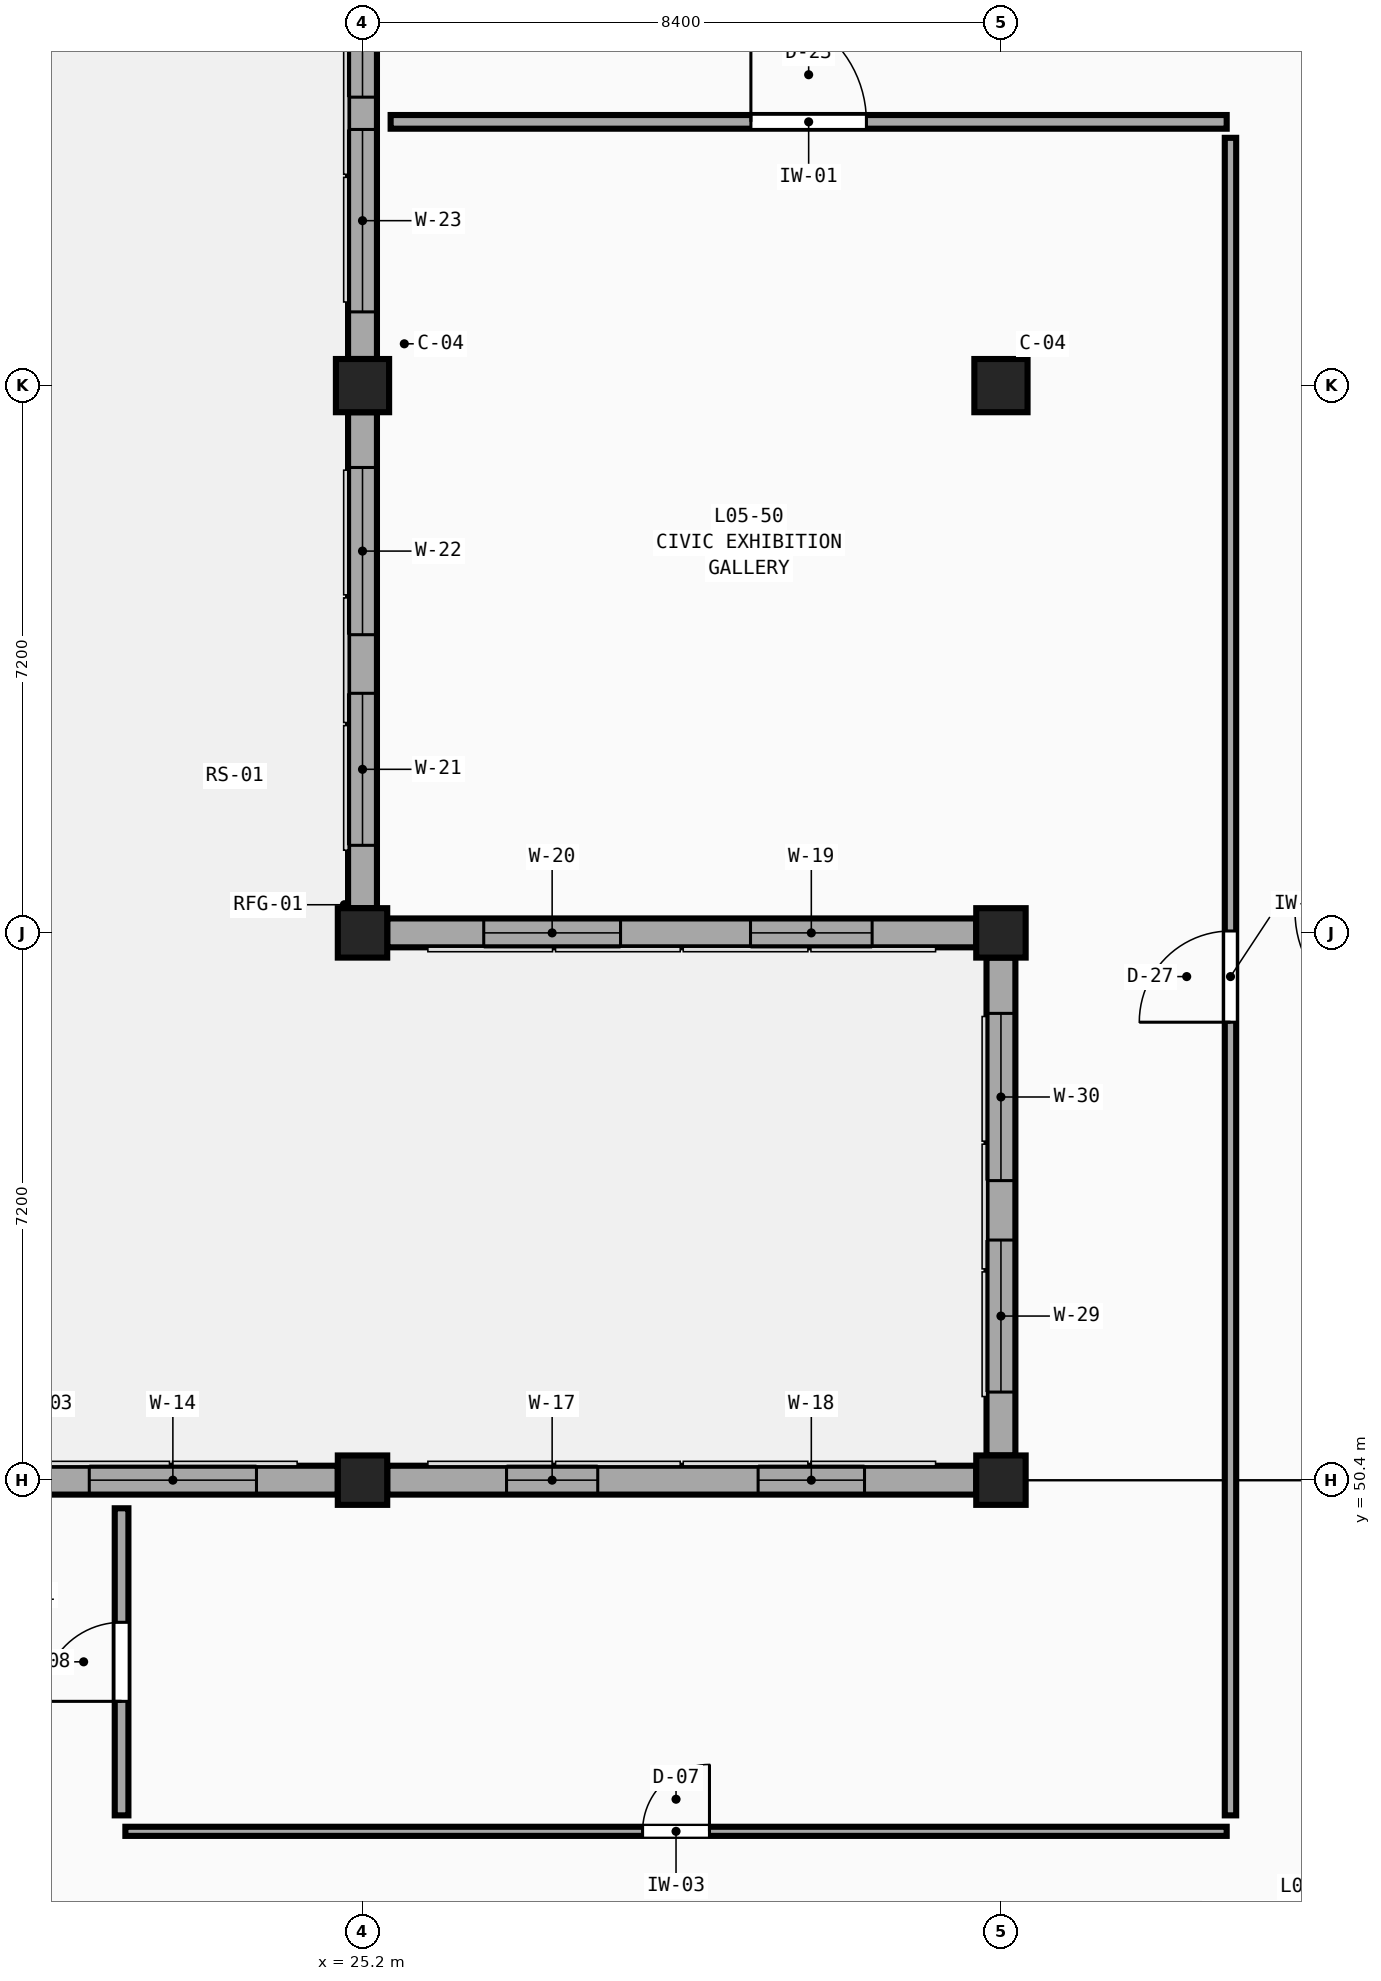
"""IFC4 building model, lengths in metres.
Left out: names, types, materials, properties, quantities, classifications, styles, units other than length and angle.
Written with IfcOpenShell. Run it as: python <this file> out.ifc"""

import sys

from ifc_helpers import new_model, si_unit, direction, frame, frame_2d, origin, origin_2d, place, context, subcontext, project, spatial, rectangle, extrude, element, fill, save


model = new_model("IFC4")
c1 = context("Model", 3, precision=1e-05, world=origin(), true_north=direction((0.0, 1.0)))
c2 = subcontext(c1, "Body", "Model", "MODEL_VIEW")
j1 = project(units=[si_unit("LENGTHUNIT", "METRE"), si_unit("PLANEANGLEUNIT", "RADIAN")], contexts=[c1])
p1 = place(None, origin())
s1 = spatial("IfcSite", under=j1, at=p1, CompositionType="ELEMENT")
p2 = place(p1, origin())
s2 = spatial("IfcBuilding", under=s1, at=p2, CompositionType="ELEMENT")
p3 = place(p2, frame((0.0, 0.0, 23.4)))
s3 = spatial("IfcBuildingStorey", under=s2, at=p3, CompositionType="ELEMENT", Elevation=23.4)
for number, where, z_axis, x_axis in (
    (1, (25.2, 50.4, 0.0), (0.0, 0.0, 1.0), (1.0, 0.0, 0.0)),
    (2, (25.2, 57.6, 0.0), (0.0, 0.0, 1.0), (1.0, 0.0, 0.0)),
):
    element("IfcColumn", number, at=place(p3, frame(where, z_axis=z_axis, x_axis=x_axis)), inside=s3, PredefinedType="COLUMN", context=c2, shape_type="SweptSolid", body=[
        extrude(rectangle(XDim=0.65, YDim=0.65, at=origin_2d()), origin(), (0.0, 0.0, 1.0), 4.5),
    ])
p4 = place(p3, frame((25.2, 64.8, 0.0), z_axis=(0.0, 0.0, 1.0), x_axis=(1.0, 0.0, 0.0)))
e3 = element("IfcColumn", 3, at=p4, inside=s3, PredefinedType="COLUMN", context=c2, shape_type="SweptSolid", body=[
    extrude(rectangle(XDim=0.7, YDim=0.7, at=origin_2d()), origin(), (0.0, 0.0, 1.0), 4.5),
])
for number, where, z_axis, x_axis in (
    (4, (33.6, 50.4, 0.0), (0.0, 0.0, 1.0), (1.0, 0.0, 0.0)),
    (5, (33.6, 57.6, 0.0), (0.0, 0.0, 1.0), (1.0, 0.0, 0.0)),
):
    element("IfcColumn", number, at=place(p3, frame(where, z_axis=z_axis, x_axis=x_axis)), inside=s3, PredefinedType="COLUMN", context=c2, shape_type="SweptSolid", body=[
        extrude(rectangle(XDim=0.65, YDim=0.65, at=origin_2d()), origin(), (0.0, 0.0, 1.0), 4.5),
    ])
p5 = place(p3, frame((33.6, 64.8, 0.0), z_axis=(0.0, 0.0, 1.0), x_axis=(1.0, 0.0, 0.0)))
e6 = element("IfcColumn", 6, at=p5, inside=s3, PredefinedType="COLUMN", context=c2, shape_type="SweptSolid", body=[
    extrude(rectangle(XDim=0.7, YDim=0.7, at=origin_2d()), origin(), (0.0, 0.0, 1.0), 4.5),
])
p6 = place(p3, frame((17.125, 50.4, 0.0), z_axis=(0.0, 0.0, 1.0), x_axis=(1.0, 0.0, 0.0)))
e7 = element("IfcWall", 7, at=p6, inside=s3, PredefinedType="SOLIDWALL", context=c2, shape_type="SweptSolid", body=[
    extrude(rectangle(XDim=7.75, YDim=0.38, at=frame_2d((3.875, 0.0))), origin(), (0.0, 0.0, 1.0), 3.66),
])
p7 = place(p6, frame((1.17, 0.0, 0.75)))
e8 = element("IfcOpeningElement", 8, at=p7, cuts=e7, PredefinedType="OPENING", context=c2, shape_type="SweptSolid", body=[
    extrude(rectangle(XDim=2.0, YDim=2.08, at=frame_2d((1.0, 1.04))), frame((0.0, 0.21, 0.0), z_axis=(0.0, -1.0, 0.0), x_axis=(1.0, 0.0, 0.0)), (0.0, 0.0, 1.0), 0.42),
])
p8 = place(p6, frame((4.48, 0.0, 0.75)))
e9 = element("IfcOpeningElement", 9, at=p8, cuts=e7, PredefinedType="OPENING", context=c2, shape_type="SweptSolid", body=[
    extrude(rectangle(XDim=2.2, YDim=2.08, at=frame_2d((1.1, 1.04))), frame((0.0, 0.21, 0.0), z_axis=(0.0, -1.0, 0.0), x_axis=(1.0, 0.0, 0.0)), (0.0, 0.0, 1.0), 0.42),
])
p9 = place(p3, frame((25.525, 50.4, 0.0), z_axis=(0.0, 0.0, 1.0), x_axis=(1.0, 0.0, 0.0)))
e10 = element("IfcWall", 10, at=p9, inside=s3, PredefinedType="SOLIDWALL", context=c2, shape_type="SweptSolid", body=[
    extrude(rectangle(XDim=7.75, YDim=0.38, at=frame_2d((3.875, 0.0))), origin(), (0.0, 0.0, 1.0), 3.66),
])
p10 = place(p9, frame((1.57, 0.0, 0.75)))
e11 = element("IfcOpeningElement", 11, at=p10, cuts=e10, PredefinedType="OPENING", context=c2, shape_type="SweptSolid", body=[
    extrude(rectangle(XDim=1.2, YDim=2.26, at=frame_2d((0.6, 1.13))), frame((0.0, 0.21, 0.0), z_axis=(0.0, -1.0, 0.0), x_axis=(1.0, 0.0, 0.0)), (0.0, 0.0, 1.0), 0.42),
])
p11 = place(p9, frame((4.88, 0.0, 0.75)))
e12 = element("IfcOpeningElement", 12, at=p11, cuts=e10, PredefinedType="OPENING", context=c2, shape_type="SweptSolid", body=[
    extrude(rectangle(XDim=1.4, YDim=2.26, at=frame_2d((0.7, 1.13))), frame((0.0, 0.21, 0.0), z_axis=(0.0, -1.0, 0.0), x_axis=(1.0, 0.0, 0.0)), (0.0, 0.0, 1.0), 0.42),
])
p12 = place(p3, frame((33.275, 57.6, 0.0), z_axis=(0.0, 0.0, 1.0), x_axis=(-1.0, 0.0, 0.0)))
e13 = element("IfcWall", 13, at=p12, inside=s3, PredefinedType="SOLIDWALL", context=c2, shape_type="SweptSolid", body=[
    extrude(rectangle(XDim=7.75, YDim=0.38, at=frame_2d((3.875, 0.0))), origin(), (0.0, 0.0, 1.0), 3.66),
])
p13 = place(p12, frame((1.37, 0.0, 0.75)))
e14 = element("IfcOpeningElement", 14, at=p13, cuts=e13, PredefinedType="OPENING", context=c2, shape_type="SweptSolid", body=[
    extrude(rectangle(XDim=1.6, YDim=2.26, at=frame_2d((0.8, 1.13))), frame((0.0, 0.21, 0.0), z_axis=(0.0, -1.0, 0.0), x_axis=(1.0, 0.0, 0.0)), (0.0, 0.0, 1.0), 0.42),
])
p14 = place(p12, frame((4.68, 0.0, 0.75)))
e15 = element("IfcOpeningElement", 15, at=p14, cuts=e13, PredefinedType="OPENING", context=c2, shape_type="SweptSolid", body=[
    extrude(rectangle(XDim=1.8, YDim=2.26, at=frame_2d((0.9, 1.13))), frame((0.0, 0.21, 0.0), z_axis=(0.0, -1.0, 0.0), x_axis=(1.0, 0.0, 0.0)), (0.0, 0.0, 1.0), 0.42),
])
p15 = place(p3, frame((25.2, 57.925, 0.0), z_axis=(0.0, 0.0, 1.0), x_axis=(0.0, 1.0, 0.0)))
e16 = element("IfcWall", 16, at=p15, inside=s3, PredefinedType="SOLIDWALL", context=c2, shape_type="SweptSolid", body=[
    extrude(rectangle(XDim=6.525, YDim=0.38, at=frame_2d((3.262, 0.0))), origin(), (0.0, 0.0, 1.0), 3.66),
])
p16 = place(p15, frame((0.827, 0.0, 0.75)))
e17 = element("IfcOpeningElement", 17, at=p16, cuts=e16, PredefinedType="OPENING", context=c2, shape_type="SweptSolid", body=[
    extrude(rectangle(XDim=2.0, YDim=2.26, at=frame_2d((1.0, 1.13))), frame((0.0, 0.21, 0.0), z_axis=(0.0, -1.0, 0.0), x_axis=(1.0, 0.0, 0.0)), (0.0, 0.0, 1.0), 0.42),
])
p17 = place(p15, frame((3.598, 0.0, 0.75)))
e18 = element("IfcOpeningElement", 18, at=p17, cuts=e16, PredefinedType="OPENING", context=c2, shape_type="SweptSolid", body=[
    extrude(rectangle(XDim=2.2, YDim=2.26, at=frame_2d((1.1, 1.13))), frame((0.0, 0.21, 0.0), z_axis=(0.0, -1.0, 0.0), x_axis=(1.0, 0.0, 0.0)), (0.0, 0.0, 1.0), 0.42),
])
p18 = place(p3, frame((25.2, 65.15, 0.0), z_axis=(0.0, 0.0, 1.0), x_axis=(0.0, 1.0, 0.0)))
e19 = element("IfcWall", 19, at=p18, inside=s3, PredefinedType="SOLIDWALL", context=c2, shape_type="SweptSolid", body=[
    extrude(rectangle(XDim=6.5, YDim=0.38, at=frame_2d((3.25, 0.0))), origin(), (0.0, 0.0, 1.0), 3.66),
])
p19 = place(p18, frame((0.62, 0.0, 0.75)))
e20 = element("IfcOpeningElement", 20, at=p19, cuts=e19, PredefinedType="OPENING", context=c2, shape_type="SweptSolid", body=[
    extrude(rectangle(XDim=2.4, YDim=2.26, at=frame_2d((1.2, 1.13))), frame((0.0, 0.21, 0.0), z_axis=(0.0, -1.0, 0.0), x_axis=(1.0, 0.0, 0.0)), (0.0, 0.0, 1.0), 0.42),
])
p20 = place(p18, frame((3.445, 0.0, 0.75)))
e21 = element("IfcOpeningElement", 21, at=p20, cuts=e19, PredefinedType="OPENING", context=c2, shape_type="SweptSolid", body=[
    extrude(rectangle(XDim=2.47, YDim=2.26, at=frame_2d((1.235, 1.13))), frame((0.0, 0.21, 0.0), z_axis=(0.0, -1.0, 0.0), x_axis=(1.0, 0.0, 0.0)), (0.0, 0.0, 1.0), 0.42),
])
p21 = place(p3, frame((33.6, 50.725, 0.0), z_axis=(0.0, 0.0, 1.0), x_axis=(0.0, 1.0, 0.0)))
e22 = element("IfcWall", 22, at=p21, inside=s3, PredefinedType="SOLIDWALL", context=c2, shape_type="SweptSolid", body=[
    extrude(rectangle(XDim=6.55, YDim=0.38, at=frame_2d((3.275, 0.0))), origin(), (0.0, 0.0, 1.0), 3.66),
])
p22 = place(p21, frame((0.834, 0.0, 0.75)))
e23 = element("IfcOpeningElement", 23, at=p22, cuts=e22, PredefinedType="OPENING", context=c2, shape_type="SweptSolid", body=[
    extrude(rectangle(XDim=2.0, YDim=2.44, at=frame_2d((1.0, 1.22))), frame((0.0, 0.21, 0.0), z_axis=(0.0, -1.0, 0.0), x_axis=(1.0, 0.0, 0.0)), (0.0, 0.0, 1.0), 0.42),
])
p23 = place(p21, frame((3.616, 0.0, 0.75)))
e24 = element("IfcOpeningElement", 24, at=p23, cuts=e22, PredefinedType="OPENING", context=c2, shape_type="SweptSolid", body=[
    extrude(rectangle(XDim=2.2, YDim=2.44, at=frame_2d((1.1, 1.22))), frame((0.0, 0.21, 0.0), z_axis=(0.0, -1.0, 0.0), x_axis=(1.0, 0.0, 0.0)), (0.0, 0.0, 1.0), 0.42),
])
p24 = place(p3, frame((36.62, 45.99, 0.0), z_axis=(0.0, 0.0, 1.0), x_axis=(0.0, 1.0, 0.0)))
e25 = element("IfcWall", 25, at=p24, inside=s3, PredefinedType="PARTITIONING", context=c2, shape_type="SweptSolid", body=[
    extrude(rectangle(XDim=22.07, YDim=0.15, at=frame_2d((11.035, 0.0))), origin(), (0.0, 0.0, 1.0), 4.21),
])
p25 = place(p24, frame((10.435, 0.0, 0.0)))
e26 = element("IfcOpeningElement", 26, at=p25, cuts=e25, PredefinedType="OPENING", context=c2, shape_type="SweptSolid", body=[
    extrude(rectangle(XDim=1.2, YDim=2.37, at=frame_2d((0.6, 1.185))), frame((0.0, 0.095, 0.0), z_axis=(0.0, -1.0, 0.0), x_axis=(1.0, 0.0, 0.0)), (0.0, 0.0, 1.0), 0.19),
])
p26 = place(p3, frame((22.08, 45.78, 0.0), z_axis=(0.0, 0.0, 1.0), x_axis=(1.0, 0.0, 0.0)))
e27 = element("IfcWall", 27, at=p26, inside=s3, PredefinedType="PARTITIONING", context=c2, shape_type="SweptSolid", body=[
    extrude(rectangle(XDim=14.49, YDim=0.12, at=frame_2d((7.245, 0.0))), origin(), (0.0, 0.0, 1.0), 4.21),
])
p27 = place(p26, frame((6.805, 0.0, 0.0)))
e28 = element("IfcOpeningElement", 28, at=p27, cuts=e27, PredefinedType="OPENING", context=c2, shape_type="SweptSolid", body=[
    extrude(rectangle(XDim=0.88, YDim=2.13, at=frame_2d((0.44, 1.065))), frame((0.0, 0.08, 0.0), z_axis=(0.0, -1.0, 0.0), x_axis=(1.0, 0.0, 0.0)), (0.0, 0.0, 1.0), 0.16),
])
p28 = place(p3, frame((25.57, 68.27, 0.0), z_axis=(0.0, 0.0, 1.0), x_axis=(1.0, 0.0, 0.0)))
e29 = element("IfcWall", 29, at=p28, inside=s3, PredefinedType="PARTITIONING", context=c2, shape_type="SweptSolid", body=[
    extrude(rectangle(XDim=11.0, YDim=0.18, at=frame_2d((5.5, 0.0))), origin(), (0.0, 0.0, 1.0), 4.21),
])
p29 = place(p28, frame((4.74, 0.0, 0.0)))
e30 = element("IfcOpeningElement", 30, at=p29, cuts=e29, PredefinedType="OPENING", context=c2, shape_type="SweptSolid", body=[
    extrude(rectangle(XDim=1.52, YDim=2.29, at=frame_2d((0.76, 1.145))), frame((0.0, 0.11, 0.0), z_axis=(0.0, -1.0, 0.0), x_axis=(1.0, 0.0, 0.0)), (0.0, 0.0, 1.0), 0.22),
])
p30 = place(p3, frame((22.03, 45.99, 0.0), z_axis=(0.0, 0.0, 1.0), x_axis=(0.0, 1.0, 0.0)))
e31 = element("IfcWall", 31, at=p30, inside=s3, PredefinedType="PARTITIONING", context=c2, shape_type="SweptSolid", body=[
    extrude(rectangle(XDim=4.04, YDim=0.18, at=frame_2d((2.02, 0.0))), origin(), (0.0, 0.0, 1.0), 4.21),
])
p31 = place(p30, frame((1.5, 0.0, 0.0)))
e32 = element("IfcOpeningElement", 32, at=p31, cuts=e31, PredefinedType="OPENING", context=c2, shape_type="SweptSolid", body=[
    extrude(rectangle(XDim=1.04, YDim=2.13, at=frame_2d((0.52, 1.065))), frame((0.0, 0.11, 0.0), z_axis=(0.0, -1.0, 0.0), x_axis=(1.0, 0.0, 0.0)), (0.0, 0.0, 1.0), 0.22),
])
p32 = place(p8, origin())
e33 = element("IfcWindow", 33, at=p32, inside=s3, PartitioningType="TRIPLE_PANEL_VERTICAL", PredefinedType="WINDOW", context=c2, shape_type="SweptSolid", body=[
    extrude(rectangle(XDim=2.2, YDim=2.08, at=frame_2d((1.1, 1.04))), frame((0.0, 0.03, 0.0), z_axis=(0.0, -1.0, 0.0), x_axis=(1.0, 0.0, 0.0)), (0.0, 0.0, 1.0), 0.06),
])
fill(e9, e33)
p33 = place(p10, origin())
e34 = element("IfcWindow", 34, at=p33, inside=s3, PartitioningType="SINGLE_PANEL", PredefinedType="WINDOW", context=c2, shape_type="SweptSolid", body=[
    extrude(rectangle(XDim=1.2, YDim=2.26, at=frame_2d((0.6, 1.13))), frame((0.0, 0.03, 0.0), z_axis=(0.0, -1.0, 0.0), x_axis=(1.0, 0.0, 0.0)), (0.0, 0.0, 1.0), 0.06),
])
fill(e11, e34)
p34 = place(p11, origin())
e35 = element("IfcWindow", 35, at=p34, inside=s3, PartitioningType="DOUBLE_PANEL_VERTICAL", PredefinedType="WINDOW", context=c2, shape_type="SweptSolid", body=[
    extrude(rectangle(XDim=1.4, YDim=2.26, at=frame_2d((0.7, 1.13))), frame((0.0, 0.03, 0.0), z_axis=(0.0, -1.0, 0.0), x_axis=(1.0, 0.0, 0.0)), (0.0, 0.0, 1.0), 0.06),
])
fill(e12, e35)
p35 = place(p13, origin())
e36 = element("IfcWindow", 36, at=p35, inside=s3, PartitioningType="DOUBLE_PANEL_VERTICAL", PredefinedType="WINDOW", context=c2, shape_type="SweptSolid", body=[
    extrude(rectangle(XDim=1.6, YDim=2.26, at=frame_2d((0.8, 1.13))), frame((0.0, 0.03, 0.0), z_axis=(0.0, -1.0, 0.0), x_axis=(1.0, 0.0, 0.0)), (0.0, 0.0, 1.0), 0.06),
])
fill(e14, e36)
p36 = place(p14, origin())
e37 = element("IfcWindow", 37, at=p36, inside=s3, PartitioningType="DOUBLE_PANEL_VERTICAL", PredefinedType="WINDOW", context=c2, shape_type="SweptSolid", body=[
    extrude(rectangle(XDim=1.8, YDim=2.26, at=frame_2d((0.9, 1.13))), frame((0.0, 0.03, 0.0), z_axis=(0.0, -1.0, 0.0), x_axis=(1.0, 0.0, 0.0)), (0.0, 0.0, 1.0), 0.06),
])
fill(e15, e37)
p37 = place(p16, origin())
e38 = element("IfcWindow", 38, at=p37, inside=s3, PartitioningType="TRIPLE_PANEL_VERTICAL", PredefinedType="WINDOW", context=c2, shape_type="SweptSolid", body=[
    extrude(rectangle(XDim=2.0, YDim=2.26, at=frame_2d((1.0, 1.13))), frame((0.0, 0.03, 0.0), z_axis=(0.0, -1.0, 0.0), x_axis=(1.0, 0.0, 0.0)), (0.0, 0.0, 1.0), 0.06),
])
fill(e17, e38)
p38 = place(p17, origin())
e39 = element("IfcWindow", 39, at=p38, inside=s3, PartitioningType="TRIPLE_PANEL_VERTICAL", PredefinedType="WINDOW", context=c2, shape_type="SweptSolid", body=[
    extrude(rectangle(XDim=2.2, YDim=2.26, at=frame_2d((1.1, 1.13))), frame((0.0, 0.03, 0.0), z_axis=(0.0, -1.0, 0.0), x_axis=(1.0, 0.0, 0.0)), (0.0, 0.0, 1.0), 0.06),
])
fill(e18, e39)
p39 = place(p19, origin())
e40 = element("IfcWindow", 40, at=p39, inside=s3, PartitioningType="TRIPLE_PANEL_VERTICAL", PredefinedType="WINDOW", context=c2, shape_type="SweptSolid", body=[
    extrude(rectangle(XDim=2.4, YDim=2.26, at=frame_2d((1.2, 1.13))), frame((0.0, 0.03, 0.0), z_axis=(0.0, -1.0, 0.0), x_axis=(1.0, 0.0, 0.0)), (0.0, 0.0, 1.0), 0.06),
])
fill(e20, e40)
p40 = place(p20, origin())
e41 = element("IfcWindow", 41, at=p40, inside=s3, PartitioningType="TRIPLE_PANEL_VERTICAL", PredefinedType="WINDOW", context=c2, shape_type="SweptSolid", body=[
    extrude(rectangle(XDim=2.47, YDim=2.26, at=frame_2d((1.235, 1.13))), frame((0.0, 0.03, 0.0), z_axis=(0.0, -1.0, 0.0), x_axis=(1.0, 0.0, 0.0)), (0.0, 0.0, 1.0), 0.06),
])
fill(e21, e41)
p41 = place(p22, origin())
e42 = element("IfcWindow", 42, at=p41, inside=s3, PartitioningType="TRIPLE_PANEL_VERTICAL", PredefinedType="WINDOW", context=c2, shape_type="SweptSolid", body=[
    extrude(rectangle(XDim=2.0, YDim=2.44, at=frame_2d((1.0, 1.22))), frame((0.0, 0.03, 0.0), z_axis=(0.0, -1.0, 0.0), x_axis=(1.0, 0.0, 0.0)), (0.0, 0.0, 1.0), 0.06),
])
fill(e23, e42)
p42 = place(p23, origin())
e43 = element("IfcWindow", 43, at=p42, inside=s3, PartitioningType="TRIPLE_PANEL_VERTICAL", PredefinedType="WINDOW", context=c2, shape_type="SweptSolid", body=[
    extrude(rectangle(XDim=2.2, YDim=2.44, at=frame_2d((1.1, 1.22))), frame((0.0, 0.03, 0.0), z_axis=(0.0, -1.0, 0.0), x_axis=(1.0, 0.0, 0.0)), (0.0, 0.0, 1.0), 0.06),
])
fill(e24, e43)
p43 = place(p25, origin())
e44 = element("IfcDoor", 44, at=p43, inside=s3, OperationType="SINGLE_SWING_LEFT", PredefinedType="DOOR", context=c2, shape_type="SweptSolid", body=[
    extrude(rectangle(XDim=1.2, YDim=2.37, at=frame_2d((0.6, 1.185))), frame((0.0, 0.025, 0.0), z_axis=(0.0, -1.0, 0.0), x_axis=(1.0, 0.0, 0.0)), (0.0, 0.0, 1.0), 0.05),
])
fill(e26, e44)
p44 = place(p27, origin())
e45 = element("IfcDoor", 45, at=p44, inside=s3, OperationType="SINGLE_SWING_RIGHT", PredefinedType="DOOR", context=c2, shape_type="SweptSolid", body=[
    extrude(rectangle(XDim=0.88, YDim=2.13, at=frame_2d((0.44, 1.065))), frame((0.0, 0.025, 0.0), z_axis=(0.0, -1.0, 0.0), x_axis=(1.0, 0.0, 0.0)), (0.0, 0.0, 1.0), 0.05),
])
fill(e28, e45)
p45 = place(p29, origin())
e46 = element("IfcDoor", 46, at=p45, inside=s3, OperationType="SINGLE_SWING_LEFT", PredefinedType="DOOR", context=c2, shape_type="SweptSolid", body=[
    extrude(rectangle(XDim=1.52, YDim=2.29, at=frame_2d((0.76, 1.145))), frame((0.0, 0.025, 0.0), z_axis=(0.0, -1.0, 0.0), x_axis=(1.0, 0.0, 0.0)), (0.0, 0.0, 1.0), 0.05),
])
fill(e30, e46)
p46 = place(p31, origin())
e47 = element("IfcDoor", 47, at=p46, inside=s3, OperationType="SINGLE_SWING_LEFT", PredefinedType="DOOR", context=c2, shape_type="SweptSolid", body=[
    extrude(rectangle(XDim=1.04, YDim=2.13, at=frame_2d((0.52, 1.065))), frame((0.0, 0.025, 0.0), z_axis=(0.0, -1.0, 0.0), x_axis=(1.0, 0.0, 0.0)), (0.0, 0.0, 1.0), 0.05),
])
fill(e32, e47)
save(model, sys.argv[1])
